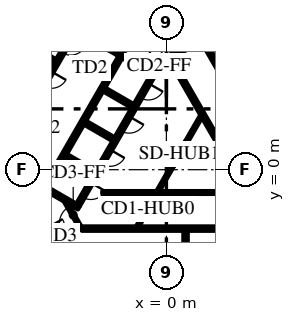
"""IFC4 building model, lengths in metres.
Left out: names, types, materials, properties, quantities, classifications, styles, units other than length and angle.
Written with IfcOpenShell. Run it as: python <this file> out.ifc"""

import sys

from ifc_helpers import new_model, si_unit, direction, frame, frame_2d, origin, place, context, subcontext, project, spatial, polyline, rectangle, outline, extrude, element, fill, save


model = new_model("IFC4")
c1 = context("Model", 3, precision=1e-05, world=origin(), true_north=direction((0.0, 1.0)))
c2 = subcontext(c1, "Body", "Model", "MODEL_VIEW")
j1 = project(units=[si_unit("LENGTHUNIT", "METRE"), si_unit("PLANEANGLEUNIT", "RADIAN")], contexts=[c1])
p1 = place(None, origin())
s1 = spatial("IfcSite", under=j1, at=p1, CompositionType="ELEMENT")
p2 = place(p1, origin())
s2 = spatial("IfcBuilding", under=s1, at=p2, CompositionType="ELEMENT")
p3 = place(p2, frame((0.0, 0.0, 21.6)))
s3 = spatial("IfcBuildingStorey", under=s2, at=p3, CompositionType="ELEMENT", Elevation=21.6)
p4 = place(p3, frame((-15.36, -1.503, 0.0), z_axis=(0.0, 0.0, 1.0), x_axis=(0.50000389221, 0.866023156604, 0.0)))
e1 = element("IfcWall", 1, at=p4, inside=s3, PredefinedType="SOLIDWALL", context=c2, shape_type="SweptSolid", body=[
    extrude(rectangle(XDim=21.0, YDim=0.9, at=frame_2d((10.5, 0.0))), origin(), (0.0, 0.0, 1.0), 6.0),
])
p5 = place(p3, frame((-5.545, -3.875, 0.0), z_axis=(0.0, 0.0, 1.0), x_axis=(1.0, 0.0, 0.0)))
e2 = element("IfcWall", 2, at=p5, inside=s3, PredefinedType="SOLIDWALL", context=c2, shape_type="SweptSolid", body=[
    extrude(rectangle(XDim=11.97, YDim=0.25, at=frame_2d((5.985, 0.0))), origin(), (0.0, 0.0, 1.0), 6.0),
])
p6 = place(p3, frame((-6.425, -3.875, 0.0), z_axis=(0.0, 0.0, 1.0), x_axis=(1.0, 0.0, 0.0)))
e3 = element("IfcWall", 3, at=p6, inside=s3, PredefinedType="SOLIDWALL", context=c2, shape_type="SweptSolid", body=[
    extrude(rectangle(XDim=0.658, YDim=0.25, at=frame_2d((0.329, 0.0))), origin(), (0.0, 0.0, 1.0), 6.0),
])
p7 = place(p3, frame((1.26, -4.0, 0.0), z_axis=(0.0, 0.0, 1.0), x_axis=(0.0, -1.0, 0.0)))
e4 = element("IfcWall", 4, at=p7, inside=s3, PredefinedType="SOLIDWALL", context=c2, shape_type="SweptSolid", body=[
    extrude(rectangle(XDim=2.2, YDim=0.25, at=frame_2d((1.1, 0.0))), origin(), (0.0, 0.0, 1.0), 6.0),
])
p8 = place(p3, frame((-6.3, -4.0, 0.0), z_axis=(0.0, 0.0, 1.0), x_axis=(0.0, -1.0, 0.0)))
e5 = element("IfcWall", 5, at=p8, inside=s3, PredefinedType="SOLIDWALL", context=c2, shape_type="SweptSolid", body=[
    extrude(rectangle(XDim=3.154, YDim=0.25, at=frame_2d((1.577, 0.0))), origin(), (0.0, 0.0, 1.0), 6.0),
])
p9 = place(p3, origin())
e6 = element("IfcWall", 6, at=p9, inside=s3, PredefinedType="SOLIDWALL", context=c2, shape_type="SweptSolid", body=[
    extrude(outline(polyline([(0.566, 6.725), (0.566, 6.875), (0.566, 6.875), (0.565, 6.875), (0.361, 6.875), (0.035, 7.439), (0.252, 7.564), (0.377, 7.348), (6.552, -3.348), (6.677, -3.564), (6.46, -3.689), (0.448, 6.725), (0.565, 6.725), (0.566, 6.725), (0.566, 6.725)])), origin(), (0.0, 0.0, 1.0), 6.0),
])
p10 = place(p3, frame((0.314, 7.456, 0.0), z_axis=(0.0, 0.0, 1.0), x_axis=(0.866013897511, 0.50001992892, 0.0)))
e7 = element("IfcWall", 7, at=p10, inside=s3, PredefinedType="SOLIDWALL", context=c2, shape_type="SweptSolid", body=[
    extrude(rectangle(XDim=3.268, YDim=0.25, at=frame_2d((1.634, 0.0))), origin(), (0.0, 0.0, 1.0), 6.0),
])
p11 = place(p3, frame((-8.06, -1.311, 0.0), z_axis=(0.0, 0.0, 1.0), x_axis=(0.50000273126, 0.866023826885, 0.0)))
e8 = element("IfcWall", 8, at=p11, inside=s3, PredefinedType="SOLIDWALL", context=c2, shape_type="SweptSolid", body=[
    extrude(rectangle(XDim=10.33, YDim=0.25, at=frame_2d((5.165, 0.0))), origin(), (0.0, 0.0, 1.0), 6.0),
])
p12 = place(p3, frame((-1.758, 6.835, 0.0), z_axis=(0.0, 0.0, 1.0), x_axis=(0.865982457891, -0.500074377092, 0.0)))
e9 = element("IfcWall", 9, at=p12, inside=s3, PredefinedType="SOLIDWALL", context=c2, shape_type="SweptSolid", body=[
    extrude(rectangle(XDim=0.2, YDim=0.25, at=frame_2d((0.1, 0.0))), origin(), (0.0, 0.0, 1.0), 6.0),
])
p13 = place(p3, frame((-1.76, 6.836, 0.0), z_axis=(0.0, 0.0, 1.0), x_axis=(-0.865952863304, 0.500125622755, 0.0)))
e10 = element("IfcWall", 10, at=p13, inside=s3, PredefinedType="SOLIDWALL", context=c2, shape_type="SweptSolid", body=[
    extrude(rectangle(XDim=1.258, YDim=0.25, at=frame_2d((0.629, 0.0))), origin(), (0.0, 0.0, 1.0), 6.0),
])
p14 = place(p3, frame((-0.728, 6.24, 0.0), z_axis=(0.0, 0.0, 1.0), x_axis=(-0.865955664968, 0.500120771724, 0.0)))
e11 = element("IfcWall", 11, at=p14, inside=s3, PredefinedType="SOLIDWALL", context=c2, shape_type="SweptSolid", body=[
    extrude(rectangle(XDim=0.778, YDim=0.25, at=frame_2d((0.389, 0.0))), origin(), (0.0, 0.0, 1.0), 6.0),
])
for number, where, z_axis, x_axis in (
    (12, (-2.204, 4.182, 0.0), (0.0, 0.0, 1.0), (-0.866, 0.5, 0.0)),
    (13, (-5.369, 3.1, 0.0), (0.0, 0.0, 1.0), (0.866, -0.5, 0.0)),
    (14, (-4.724, -0.182, 0.0), (0.0, 0.0, 1.0), (-0.866, 0.5, 0.0)),
):
    element("IfcWall", number, at=place(p3, frame(where, z_axis=z_axis, x_axis=x_axis)), inside=s3, PredefinedType="SOLIDWALL", context=c2, shape_type="SweptSolid", body=[
        extrude(rectangle(XDim=2.2, YDim=0.25, at=frame_2d((1.1, 0.0))), origin(), (0.0, 0.0, 1.0), 6.0),
    ])
e15 = element("IfcWall", 15, at=p9, inside=s3, PredefinedType="SOLIDWALL", context=c2, shape_type="SweptSolid", body=[
    extrude(outline(polyline([(-5.922, -2.257), (-5.922, -2.257), (-5.705, -2.382), (-5.83, -2.598), (-6.483, -2.221), (-6.591, -2.033), (-6.591, -2.033), (-6.7, -2.096), (-7.952, -1.373), (-7.827, -1.156), (-5.922, -2.257)])), origin(), (0.0, 0.0, 1.0), 6.0),
])
e16 = element("IfcWall", 16, at=p9, inside=s3, PredefinedType="SOLIDWALL", context=c2, shape_type="SweptSolid", body=[
    extrude(outline(polyline([(-3.128, 7.481), (-3.259, 7.557), (-3.134, 7.773), (-3.003, 7.698), (-3.128, 7.481)])), origin(), (0.0, 0.0, 1.0), 6.0),
])
p15 = place(p3, frame((-7.314, 7.132, 0.0), z_axis=(0.0, 0.0, 1.0), x_axis=(-0.866008176907, 0.50002983664, 0.0)))
e17 = element("IfcWall", 17, at=p15, inside=s3, PredefinedType="SOLIDWALL", context=c2, shape_type="SweptSolid", body=[
    extrude(rectangle(XDim=2.2, YDim=0.25, at=frame_2d((1.1, 0.0))), origin(), (0.0, 0.0, 1.0), 6.0),
])
p16 = place(p3, frame((-1.887, -3.718, 0.0), z_axis=(0.0, 0.0, 1.0), x_axis=(0.500165633897, 0.865929753888, 0.0)))
e18 = element("IfcWall", 18, at=p16, inside=s3, PredefinedType="PARTITIONING", context=c2, shape_type="SweptSolid", body=[
    extrude(rectangle(XDim=0.254, YDim=0.15, at=frame_2d((0.127, 0.0))), origin(), (0.0, 0.0, 1.0), 4.85),
])
p17 = place(p3, frame((-4.2, -1.5, 0.0), z_axis=(0.0, 0.0, 1.0), x_axis=(1.0, 0.0, 0.0)))
e19 = element("IfcWall", 19, at=p17, inside=s3, PredefinedType="PARTITIONING", context=c2, shape_type="SweptSolid", body=[
    extrude(rectangle(XDim=9.359, YDim=0.15, at=frame_2d((4.68, 0.0))), origin(), (0.0, 0.0, 1.0), 4.85),
])
p18 = place(p3, frame((-0.544, -1.393, 0.0), z_axis=(0.0, 0.0, 1.0), x_axis=(0.499928740635, 0.866066541489, 0.0)))
e20 = element("IfcWall", 20, at=p18, inside=s3, PredefinedType="PARTITIONING", context=c2, shape_type="SweptSolid", body=[
    extrude(rectangle(XDim=1.912, YDim=0.15, at=frame_2d((0.956, 0.0))), origin(), (0.0, 0.0, 1.0), 4.85),
])
p19 = place(p3, frame((1.312, 1.822, 0.0), z_axis=(0.0, 0.0, 1.0), x_axis=(0.500003549559, 0.866023354436, 0.0)))
e21 = element("IfcWall", 21, at=p19, inside=s3, PredefinedType="PARTITIONING", context=c2, shape_type="SweptSolid", body=[
    extrude(rectangle(XDim=1.93, YDim=0.15, at=frame_2d((0.965, 0.0))), origin(), (0.0, 0.0, 1.0), 4.85),
])
p20 = place(p3, frame((8.565, -2.185, 0.0), z_axis=(0.0, 0.0, 1.0), x_axis=(-0.499997954832, 0.866026584559, 0.0)))
e22 = element("IfcWall", 22, at=p20, inside=s3, PredefinedType="SOLIDWALL", context=c2, shape_type="SweptSolid", body=[
    extrude(rectangle(XDim=12.35, YDim=0.25, at=frame_2d((6.175, 0.0))), origin(), (0.0, 0.0, 1.0), 6.0),
])
p21 = place(p20, frame((5.725, 0.0, 0.0)))
e23 = element("IfcOpeningElement", 23, at=p21, cuts=e22, PredefinedType="OPENING", context=c2, shape_type="SweptSolid", body=[
    extrude(rectangle(XDim=0.9, YDim=2.1, at=frame_2d((0.45, 1.05))), frame((0.0, 0.135, 0.0), z_axis=(0.0, -1.0, 0.0), x_axis=(1.0, 0.0, 0.0)), (0.0, 0.0, 1.0), 0.27),
])
p22 = place(p3, frame((-6.008, 9.144, 0.0), z_axis=(0.0, 0.0, 1.0), x_axis=(-0.500006956611, -0.866021387346, 0.0)))
e24 = element("IfcWall", 24, at=p22, inside=s3, PredefinedType="SOLIDWALL", context=c2, shape_type="SweptSolid", body=[
    extrude(rectangle(XDim=9.83, YDim=0.25, at=frame_2d((4.915, 0.0))), origin(), (0.0, 0.0, 1.0), 6.0),
])
p23 = place(p22, frame((0.585, 0.0, 0.0)))
e25 = element("IfcOpeningElement", 25, at=p23, cuts=e24, PredefinedType="OPENING", context=c2, shape_type="SweptSolid", body=[
    extrude(rectangle(XDim=1.1, YDim=2.1, at=frame_2d((0.55, 1.05))), frame((0.0, 0.135, 0.0), z_axis=(0.0, -1.0, 0.0), x_axis=(1.0, 0.0, 0.0)), (0.0, 0.0, 1.0), 0.27),
])
p24 = place(p22, frame((3.105, 0.0, 0.0)))
e26 = element("IfcOpeningElement", 26, at=p24, cuts=e24, PredefinedType="OPENING", context=c2, shape_type="SweptSolid", body=[
    extrude(rectangle(XDim=1.1, YDim=2.1, at=frame_2d((0.55, 1.05))), frame((0.0, 0.135, 0.0), z_axis=(0.0, -1.0, 0.0), x_axis=(1.0, 0.0, 0.0)), (0.0, 0.0, 1.0), 0.27),
])
p25 = place(p22, frame((6.985, 0.0, 0.0)))
e27 = element("IfcOpeningElement", 27, at=p25, cuts=e24, PredefinedType="OPENING", context=c2, shape_type="SweptSolid", body=[
    extrude(rectangle(XDim=0.9, YDim=2.1, at=frame_2d((0.45, 1.05))), frame((0.0, 0.135, 0.0), z_axis=(0.0, -1.0, 0.0), x_axis=(1.0, 0.0, 0.0)), (0.0, 0.0, 1.0), 0.27),
])
p26 = place(p3, frame((-0.898, 6.194, 0.0), z_axis=(0.0, 0.0, 1.0), x_axis=(-0.499996202215, -0.866027596426, 0.0)))
e28 = element("IfcWall", 28, at=p26, inside=s3, PredefinedType="SOLIDWALL", context=c2, shape_type="SweptSolid", body=[
    extrude(rectangle(XDim=9.83, YDim=0.25, at=frame_2d((4.915, 0.0))), origin(), (0.0, 0.0, 1.0), 6.0),
])
p27 = place(p26, frame((0.585, 0.0, 0.0)))
e29 = element("IfcOpeningElement", 29, at=p27, cuts=e28, PredefinedType="OPENING", context=c2, shape_type="SweptSolid", body=[
    extrude(rectangle(XDim=1.1, YDim=2.1, at=frame_2d((0.55, 1.05))), frame((0.0, 0.135, 0.0), z_axis=(0.0, -1.0, 0.0), x_axis=(1.0, 0.0, 0.0)), (0.0, 0.0, 1.0), 0.27),
])
p28 = place(p26, frame((3.105, 0.0, 0.0)))
e30 = element("IfcOpeningElement", 30, at=p28, cuts=e28, PredefinedType="OPENING", context=c2, shape_type="SweptSolid", body=[
    extrude(rectangle(XDim=1.1, YDim=2.1, at=frame_2d((0.55, 1.05))), frame((0.0, 0.135, 0.0), z_axis=(0.0, -1.0, 0.0), x_axis=(1.0, 0.0, 0.0)), (0.0, 0.0, 1.0), 0.27),
])
p29 = place(p26, frame((5.625, 0.0, 0.0)))
e31 = element("IfcOpeningElement", 31, at=p29, cuts=e28, PredefinedType="OPENING", context=c2, shape_type="SweptSolid", body=[
    extrude(rectangle(XDim=1.1, YDim=2.1, at=frame_2d((0.55, 1.05))), frame((0.0, 0.135, 0.0), z_axis=(0.0, -1.0, 0.0), x_axis=(1.0, 0.0, 0.0)), (0.0, 0.0, 1.0), 0.27),
])
p30 = place(p26, frame((8.145, 0.0, 0.0)))
e32 = element("IfcOpeningElement", 32, at=p30, cuts=e28, PredefinedType="OPENING", context=c2, shape_type="SweptSolid", body=[
    extrude(rectangle(XDim=1.1, YDim=2.1, at=frame_2d((0.55, 1.05))), frame((0.0, 0.135, 0.0), z_axis=(0.0, -1.0, 0.0), x_axis=(1.0, 0.0, 0.0)), (0.0, 0.0, 1.0), 0.27),
])
p31 = place(p3, frame((-8.103, -3.466, 0.0), z_axis=(0.0, 0.0, 1.0), x_axis=(0.500078061341, -0.865980330357, 0.0)))
e33 = element("IfcWall", 33, at=p31, inside=s3, PredefinedType="SOLIDWALL", context=c2, shape_type="SweptSolid", body=[
    extrude(rectangle(XDim=2.1, YDim=0.4, at=frame_2d((1.05, 0.0))), origin(), (0.0, 0.0, 1.0), 6.0),
])
p32 = place(p31, frame((0.45, 0.0, 0.0)))
e34 = element("IfcOpeningElement", 34, at=p32, cuts=e33, PredefinedType="OPENING", context=c2, shape_type="SweptSolid", body=[
    extrude(rectangle(XDim=1.2, YDim=2.1, at=frame_2d((0.6, 1.05))), frame((0.0, 0.21, 0.0), z_axis=(0.0, -1.0, 0.0), x_axis=(1.0, 0.0, 0.0)), (0.0, 0.0, 1.0), 0.42),
])
p33 = place(p3, frame((-1.76, -3.498, 0.0), z_axis=(0.0, 0.0, 1.0), x_axis=(0.499977374825, 0.866038466041, 0.0)))
e35 = element("IfcWall", 35, at=p33, inside=s3, PredefinedType="PARTITIONING", context=c2, shape_type="SweptSolid", body=[
    extrude(rectangle(XDim=2.1, YDim=0.15, at=frame_2d((1.05, 0.0))), origin(), (0.0, 0.0, 1.0), 4.85),
])
p34 = place(p33, frame((0.6, 0.0, 0.0)))
e36 = element("IfcOpeningElement", 36, at=p34, cuts=e35, PredefinedType="OPENING", context=c2, shape_type="SweptSolid", body=[
    extrude(rectangle(XDim=0.9, YDim=2.1, at=frame_2d((0.45, 1.05))), frame((0.0, 0.085, 0.0), z_axis=(0.0, -1.0, 0.0), x_axis=(1.0, 0.0, 0.0)), (0.0, 0.0, 1.0), 0.17),
])
p35 = place(p3, frame((-1.534, 6.8, 0.0), z_axis=(0.0, 0.0, 1.0), x_axis=(1.0, 0.0, 0.0)))
e37 = element("IfcWall", 37, at=p35, inside=s3, PredefinedType="PARTITIONING", context=c2, shape_type="SweptSolid", body=[
    extrude(rectangle(XDim=2.1, YDim=0.15, at=frame_2d((1.05, 0.0))), origin(), (0.0, 0.0, 1.0), 4.85),
])
p36 = place(p35, frame((0.45, 0.0, 0.0)))
e38 = element("IfcOpeningElement", 38, at=p36, cuts=e37, PredefinedType="OPENING", context=c2, shape_type="SweptSolid", body=[
    extrude(rectangle(XDim=1.2, YDim=2.1, at=frame_2d((0.6, 1.05))), frame((0.0, 0.085, 0.0), z_axis=(0.0, -1.0, 0.0), x_axis=(1.0, 0.0, 0.0)), (0.0, 0.0, 1.0), 0.17),
])
p37 = place(p3, frame((-5.606, -3.89, 0.0), z_axis=(0.0, 0.0, 1.0), x_axis=(-0.500027713859, 0.866009402589, 0.0)))
e39 = element("IfcWall", 39, at=p37, inside=s3, PredefinedType="PARTITIONING", context=c2, shape_type="SweptSolid", body=[
    extrude(rectangle(XDim=2.1, YDim=0.15, at=frame_2d((1.05, 0.0))), origin(), (0.0, 0.0, 1.0), 4.85),
])
p38 = place(p37, frame((0.45, 0.0, 0.0)))
e40 = element("IfcOpeningElement", 40, at=p38, cuts=e39, PredefinedType="OPENING", context=c2, shape_type="SweptSolid", body=[
    extrude(rectangle(XDim=1.2, YDim=2.1, at=frame_2d((0.6, 1.05))), frame((0.0, 0.085, 0.0), z_axis=(0.0, -1.0, 0.0), x_axis=(1.0, 0.0, 0.0)), (0.0, 0.0, 1.0), 0.17),
])
p39 = place(p3, frame((-4.409, 8.365, 0.0), z_axis=(0.0, 0.0, 1.0), x_axis=(0.866034573852, -0.49998411664, 0.0)))
e41 = element("IfcWall", 41, at=p39, inside=s3, PredefinedType="SOLIDWALL", context=c2, shape_type="SweptSolid", body=[
    extrude(rectangle(XDim=1.4, YDim=0.25, at=frame_2d((0.7, 0.0))), origin(), (0.0, 0.0, 1.0), 6.0),
])
p40 = place(p39, frame((0.1, 0.0, 0.0)))
e42 = element("IfcOpeningElement", 42, at=p40, cuts=e41, PredefinedType="OPENING", context=c2, shape_type="SweptSolid", body=[
    extrude(rectangle(XDim=1.2, YDim=2.1, at=frame_2d((0.6, 1.05))), frame((0.0, 0.135, 0.0), z_axis=(0.0, -1.0, 0.0), x_axis=(1.0, 0.0, 0.0)), (0.0, 0.0, 1.0), 0.27),
])
p41 = place(p3, frame((0.412, 0.263, 0.0), z_axis=(0.0, 0.0, 1.0), x_axis=(0.500062916607, 0.865989075817, 0.0)))
e43 = element("IfcWall", 43, at=p41, inside=s3, PredefinedType="PARTITIONING", context=c2, shape_type="SweptSolid", body=[
    extrude(rectangle(XDim=1.8, YDim=0.15, at=frame_2d((0.9, 0.0))), origin(), (0.0, 0.0, 1.0), 4.85),
])
p42 = place(p41, frame((0.45, 0.0, 0.0)))
e44 = element("IfcOpeningElement", 44, at=p42, cuts=e43, PredefinedType="OPENING", context=c2, shape_type="SweptSolid", body=[
    extrude(rectangle(XDim=0.9, YDim=2.1, at=frame_2d((0.45, 1.05))), frame((0.0, 0.085, 0.0), z_axis=(0.0, -1.0, 0.0), x_axis=(1.0, 0.0, 0.0)), (0.0, 0.0, 1.0), 0.17),
])
p43 = place(p3, frame((-6.875, 40.198, 0.0), z_axis=(0.0, 0.0, 1.0), x_axis=(-0.500000527961, -0.866025098966, 0.0)))
e45 = element("IfcWall", 45, at=p43, inside=s3, PredefinedType="SOLIDWALL", context=c2, shape_type="SweptSolid", body=[
    extrude(rectangle(XDim=62.75, YDim=0.25, at=frame_2d((31.375, 0.0))), origin(), (0.0, 0.0, 1.0), 4.5),
])
p44 = place(p23, origin())
e46 = element("IfcDoor", 46, at=p44, inside=s3, OperationType="DOUBLE_DOOR_SLIDING", PredefinedType="DOOR", context=c2, shape_type="SweptSolid", body=[
    extrude(rectangle(XDim=1.1, YDim=2.1, at=frame_2d((0.55, 1.05))), frame((0.0, 0.025, 0.0), z_axis=(0.0, -1.0, 0.0), x_axis=(1.0, 0.0, 0.0)), (0.0, 0.0, 1.0), 0.05),
])
fill(e25, e46)
p45 = place(p27, origin())
e47 = element("IfcDoor", 47, at=p45, inside=s3, OperationType="DOUBLE_DOOR_SLIDING", PredefinedType="DOOR", context=c2, shape_type="SweptSolid", body=[
    extrude(rectangle(XDim=1.1, YDim=2.1, at=frame_2d((0.55, 1.05))), frame((0.0, 0.025, 0.0), z_axis=(0.0, -1.0, 0.0), x_axis=(1.0, 0.0, 0.0)), (0.0, 0.0, 1.0), 0.05),
])
fill(e29, e47)
p46 = place(p28, origin())
e48 = element("IfcDoor", 48, at=p46, inside=s3, OperationType="DOUBLE_DOOR_SLIDING", PredefinedType="DOOR", context=c2, shape_type="SweptSolid", body=[
    extrude(rectangle(XDim=1.1, YDim=2.1, at=frame_2d((0.55, 1.05))), frame((0.0, 0.025, 0.0), z_axis=(0.0, -1.0, 0.0), x_axis=(1.0, 0.0, 0.0)), (0.0, 0.0, 1.0), 0.05),
])
fill(e30, e48)
p47 = place(p29, origin())
e49 = element("IfcDoor", 49, at=p47, inside=s3, OperationType="DOUBLE_DOOR_SLIDING", PredefinedType="DOOR", context=c2, shape_type="SweptSolid", body=[
    extrude(rectangle(XDim=1.1, YDim=2.1, at=frame_2d((0.55, 1.05))), frame((0.0, 0.025, 0.0), z_axis=(0.0, -1.0, 0.0), x_axis=(1.0, 0.0, 0.0)), (0.0, 0.0, 1.0), 0.05),
])
fill(e31, e49)
p48 = place(p30, origin())
e50 = element("IfcDoor", 50, at=p48, inside=s3, OperationType="DOUBLE_DOOR_SLIDING", PredefinedType="DOOR", context=c2, shape_type="SweptSolid", body=[
    extrude(rectangle(XDim=1.1, YDim=2.1, at=frame_2d((0.55, 1.05))), frame((0.0, 0.025, 0.0), z_axis=(0.0, -1.0, 0.0), x_axis=(1.0, 0.0, 0.0)), (0.0, 0.0, 1.0), 0.05),
])
fill(e32, e50)
p49 = place(p32, origin())
e51 = element("IfcDoor", 51, at=p49, inside=s3, OperationType="SINGLE_SWING_LEFT", PredefinedType="DOOR", context=c2, shape_type="SweptSolid", body=[
    extrude(rectangle(XDim=1.2, YDim=2.1, at=frame_2d((0.6, 1.05))), frame((0.0, 0.025, 0.0), z_axis=(0.0, -1.0, 0.0), x_axis=(1.0, 0.0, 0.0)), (0.0, 0.0, 1.0), 0.05),
])
fill(e34, e51)
p50 = place(p34, origin())
e52 = element("IfcDoor", 52, at=p50, inside=s3, OperationType="SINGLE_SWING_LEFT", PredefinedType="DOOR", context=c2, shape_type="SweptSolid", body=[
    extrude(rectangle(XDim=0.9, YDim=2.1, at=frame_2d((0.45, 1.05))), frame((0.0, 0.025, 0.0), z_axis=(0.0, -1.0, 0.0), x_axis=(1.0, 0.0, 0.0)), (0.0, 0.0, 1.0), 0.05),
])
fill(e36, e52)
p51 = place(p36, origin())
e53 = element("IfcDoor", 53, at=p51, inside=s3, OperationType="SINGLE_SWING_LEFT", PredefinedType="DOOR", context=c2, shape_type="SweptSolid", body=[
    extrude(rectangle(XDim=1.2, YDim=2.1, at=frame_2d((0.6, 1.05))), frame((0.0, 0.025, 0.0), z_axis=(0.0, -1.0, 0.0), x_axis=(1.0, 0.0, 0.0)), (0.0, 0.0, 1.0), 0.05),
])
fill(e38, e53)
p52 = place(p38, origin())
e54 = element("IfcDoor", 54, at=p52, inside=s3, OperationType="SINGLE_SWING_LEFT", PredefinedType="DOOR", context=c2, shape_type="SweptSolid", body=[
    extrude(rectangle(XDim=1.2, YDim=2.1, at=frame_2d((0.6, 1.05))), frame((0.0, 0.025, 0.0), z_axis=(0.0, -1.0, 0.0), x_axis=(1.0, 0.0, 0.0)), (0.0, 0.0, 1.0), 0.05),
])
fill(e40, e54)
p53 = place(p40, origin())
e55 = element("IfcDoor", 55, at=p53, inside=s3, OperationType="SINGLE_SWING_LEFT", PredefinedType="DOOR", context=c2, shape_type="SweptSolid", body=[
    extrude(rectangle(XDim=1.2, YDim=2.1, at=frame_2d((0.6, 1.05))), frame((0.0, 0.025, 0.0), z_axis=(0.0, -1.0, 0.0), x_axis=(1.0, 0.0, 0.0)), (0.0, 0.0, 1.0), 0.05),
])
fill(e42, e55)
p54 = place(p42, origin())
e56 = element("IfcDoor", 56, at=p54, inside=s3, OperationType="SINGLE_SWING_LEFT", PredefinedType="DOOR", context=c2, shape_type="SweptSolid", body=[
    extrude(rectangle(XDim=0.9, YDim=2.1, at=frame_2d((0.45, 1.05))), frame((0.0, 0.025, 0.0), z_axis=(0.0, -1.0, 0.0), x_axis=(1.0, 0.0, 0.0)), (0.0, 0.0, 1.0), 0.05),
])
fill(e44, e56)
save(model, sys.argv[1])
